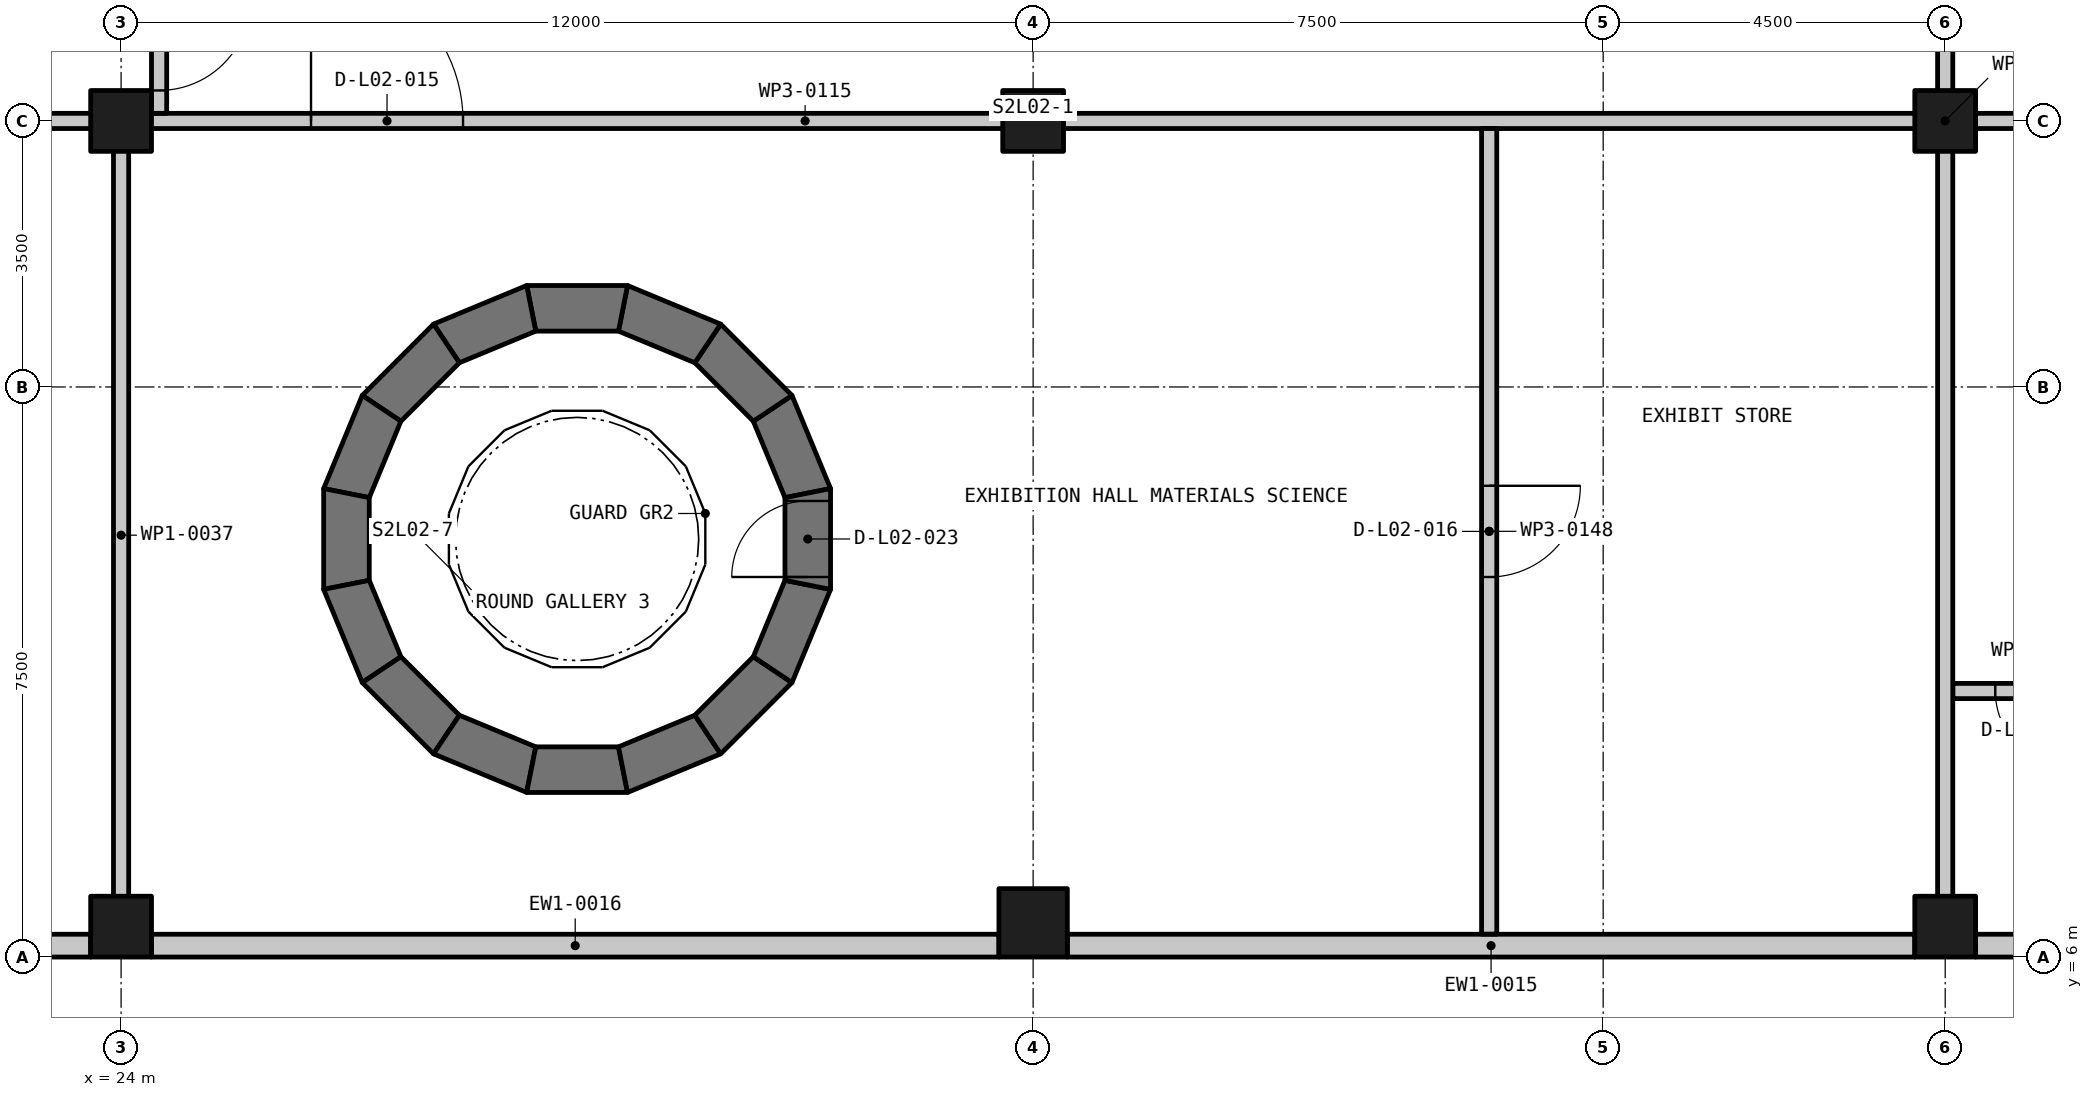
"""IFC4 building model, lengths in metres.
Left out: names, types, materials, properties, quantities, classifications, styles, units other than length and angle.
Written with IfcOpenShell. Run it as: python <this file> out.ifc"""

import sys

from ifc_helpers import new_model, si_unit, direction, frame, frame_2d, origin, origin_2d, place, context, subcontext, project, spatial, polyline, rectangle, outline, extrude, element, fill, save


model = new_model("IFC4")
c1 = context("Model", 3, precision=1e-05, world=origin(), true_north=direction((0.0, 1.0)))
c2 = subcontext(c1, "Body", "Model", "MODEL_VIEW")
j1 = project(units=[si_unit("LENGTHUNIT", "METRE"), si_unit("PLANEANGLEUNIT", "RADIAN")], contexts=[c1])
p1 = place(None, origin())
s1 = spatial("IfcSite", under=j1, at=p1, CompositionType="ELEMENT")
p2 = place(p1, origin())
s2 = spatial("IfcBuilding", under=s1, at=p2, CompositionType="ELEMENT")
p3 = place(p2, frame((0.0, 0.0, 11.25)))
s3 = spatial("IfcBuildingStorey", under=s2, at=p3, CompositionType="ELEMENT", Elevation=11.25)
p4 = place(p3, frame((24.0, 6.4, -0.3), z_axis=(0.0, 0.0, 1.0), x_axis=(1.0, 0.0, 0.0)))
e1 = element("IfcColumn", 1, at=p4, inside=s3, PredefinedType="COLUMN", context=c2, shape_type="SweptSolid", body=[
    extrude(rectangle(XDim=0.8, YDim=0.8, at=origin_2d()), origin(), (0.0, 0.0, 1.0), 4.16),
])
p5 = place(p3, frame((24.0, 17.0, -0.3), z_axis=(0.0, 0.0, 1.0), x_axis=(1.0, 0.0, 0.0)))
e2 = element("IfcColumn", 2, at=p5, inside=s3, PredefinedType="COLUMN", context=c2, shape_type="SweptSolid", body=[
    extrude(rectangle(XDim=0.8, YDim=0.8, at=origin_2d()), origin(), (0.0, 0.0, 1.0), 4.05),
])
p6 = place(p3, frame((36.0, 6.45, -0.3), z_axis=(0.0, 0.0, 1.0), x_axis=(1.0, 0.0, 0.0)))
e3 = element("IfcColumn", 3, at=p6, inside=s3, PredefinedType="COLUMN", context=c2, shape_type="SweptSolid", body=[
    extrude(rectangle(XDim=0.9, YDim=0.9, at=origin_2d()), origin(), (0.0, 0.0, 1.0), 4.16),
])
p7 = place(p3, frame((36.0, 17.0, -0.3), z_axis=(0.0, 0.0, 1.0), x_axis=(1.0, 0.0, 0.0)))
e4 = element("IfcColumn", 4, at=p7, inside=s3, PredefinedType="COLUMN", context=c2, shape_type="SweptSolid", body=[
    extrude(rectangle(XDim=0.8, YDim=0.8, at=origin_2d()), origin(), (0.0, 0.0, 1.0), 4.05),
])
p8 = place(p3, frame((48.0, 6.4, -0.3), z_axis=(0.0, 0.0, 1.0), x_axis=(1.0, 0.0, 0.0)))
e5 = element("IfcColumn", 5, at=p8, inside=s3, PredefinedType="COLUMN", context=c2, shape_type="SweptSolid", body=[
    extrude(rectangle(XDim=0.8, YDim=0.8, at=origin_2d()), origin(), (0.0, 0.0, 1.0), 4.16),
])
p9 = place(p3, frame((48.0, 17.0, -0.3), z_axis=(0.0, 0.0, 1.0), x_axis=(1.0, 0.0, 0.0)))
e6 = element("IfcColumn", 6, at=p9, inside=s3, PredefinedType="COLUMN", context=c2, shape_type="SweptSolid", body=[
    extrude(rectangle(XDim=0.8, YDim=0.8, at=origin_2d()), origin(), (0.0, 0.0, 1.0), 4.05),
])
p10 = place(p3, frame((33.058, 12.049, -0.3), z_axis=(0.0, 0.0, 1.0), x_axis=(-0.382785205205, 0.923837370253, 0.0)))
e7 = element("IfcWall", 7, at=p10, inside=s3, PredefinedType="SHEAR", context=c2, shape_type="SweptSolid", body=[
    extrude(outline(polyline([(0.0, -0.3), (1.327, -0.3), (1.207, 0.3), (0.119, 0.3), (0.0, -0.3)])), origin(), (0.0, 0.0, 1.0), 4.5),
])
p11 = place(p3, frame((32.615, 13.177, -0.3), z_axis=(0.0, 0.0, 1.0), x_axis=(-0.707106781187, 0.707106781187, 0.0)))
e8 = element("IfcWall", 8, at=p11, inside=s3, PredefinedType="SHEAR", context=c2, shape_type="SweptSolid", body=[
    extrude(outline(polyline([(0.0, -0.3), (1.326, -0.3), (1.207, 0.3), (0.119, 0.3), (0.0, -0.3)])), origin(), (0.0, 0.0, 1.0), 4.5),
])
p12 = place(p3, frame((31.774, 14.05, -0.3), z_axis=(0.0, 0.0, 1.0), x_axis=(-0.923837370253, 0.382785205205, 0.0)))
e9 = element("IfcWall", 9, at=p12, inside=s3, PredefinedType="SHEAR", context=c2, shape_type="SweptSolid", body=[
    extrude(outline(polyline([(0.0, -0.3), (1.327, -0.3), (1.207, 0.3), (0.119, 0.3), (0.0, -0.3)])), origin(), (0.0, 0.0, 1.0), 4.5),
])
p13 = place(p3, frame((30.663, 14.535, -0.3), z_axis=(0.0, 0.0, 1.0), x_axis=(-1.0, 0.0, 0.0)))
e10 = element("IfcWall", 10, at=p13, inside=s3, PredefinedType="SHEAR", context=c2, shape_type="SweptSolid", body=[
    extrude(outline(polyline([(0.0, -0.3), (1.327, -0.3), (1.207, 0.3), (0.119, 0.3), (0.0, -0.3)])), origin(), (0.0, 0.0, 1.0), 4.5),
])
p14 = place(p3, frame((29.451, 14.558, -0.3), z_axis=(0.0, 0.0, 1.0), x_axis=(-0.923837370253, -0.382785205205, 0.0)))
e11 = element("IfcWall", 11, at=p14, inside=s3, PredefinedType="SHEAR", context=c2, shape_type="SweptSolid", body=[
    extrude(outline(polyline([(0.0, -0.3), (1.327, -0.3), (1.207, 0.3), (0.119, 0.3), (0.0, -0.3)])), origin(), (0.0, 0.0, 1.0), 4.5),
])
p15 = place(p3, frame((28.323, 14.115, -0.3), z_axis=(0.0, 0.0, 1.0), x_axis=(-0.707106781187, -0.707106781187, 0.0)))
e12 = element("IfcWall", 12, at=p15, inside=s3, PredefinedType="SHEAR", context=c2, shape_type="SweptSolid", body=[
    extrude(outline(polyline([(0.0, -0.3), (1.326, -0.3), (1.207, 0.3), (0.119, 0.3), (0.0, -0.3)])), origin(), (0.0, 0.0, 1.0), 4.5),
])
p16 = place(p3, frame((27.45, 13.274, -0.3), z_axis=(0.0, 0.0, 1.0), x_axis=(-0.382785205205, -0.923837370253, 0.0)))
e13 = element("IfcWall", 13, at=p16, inside=s3, PredefinedType="SHEAR", context=c2, shape_type="SweptSolid", body=[
    extrude(outline(polyline([(0.0, -0.3), (1.327, -0.3), (1.207, 0.3), (0.119, 0.3), (0.0, -0.3)])), origin(), (0.0, 0.0, 1.0), 4.5),
])
p17 = place(p3, frame((26.965, 12.163, -0.3), z_axis=(0.0, 0.0, 1.0), x_axis=(0.0, -1.0, 0.0)))
e14 = element("IfcWall", 14, at=p17, inside=s3, PredefinedType="SHEAR", context=c2, shape_type="SweptSolid", body=[
    extrude(outline(polyline([(0.0, -0.3), (1.327, -0.3), (1.207, 0.3), (0.119, 0.3), (0.0, -0.3)])), origin(), (0.0, 0.0, 1.0), 4.5),
])
p18 = place(p3, frame((26.942, 10.951, -0.3), z_axis=(0.0, 0.0, 1.0), x_axis=(0.382785205205, -0.923837370253, 0.0)))
e15 = element("IfcWall", 15, at=p18, inside=s3, PredefinedType="SHEAR", context=c2, shape_type="SweptSolid", body=[
    extrude(outline(polyline([(0.0, -0.3), (1.327, -0.3), (1.207, 0.3), (0.119, 0.3), (0.0, -0.3)])), origin(), (0.0, 0.0, 1.0), 4.5),
])
p19 = place(p3, frame((27.385, 9.823, -0.3), z_axis=(0.0, 0.0, 1.0), x_axis=(0.707106781187, -0.707106781187, 0.0)))
e16 = element("IfcWall", 16, at=p19, inside=s3, PredefinedType="SHEAR", context=c2, shape_type="SweptSolid", body=[
    extrude(outline(polyline([(0.0, -0.3), (1.326, -0.3), (1.207, 0.3), (0.119, 0.3), (0.0, -0.3)])), origin(), (0.0, 0.0, 1.0), 4.5),
])
p20 = place(p3, frame((28.226, 8.95, -0.3), z_axis=(0.0, 0.0, 1.0), x_axis=(0.923837370253, -0.382785205205, 0.0)))
e17 = element("IfcWall", 17, at=p20, inside=s3, PredefinedType="SHEAR", context=c2, shape_type="SweptSolid", body=[
    extrude(outline(polyline([(0.0, -0.3), (1.327, -0.3), (1.207, 0.3), (0.119, 0.3), (0.0, -0.3)])), origin(), (0.0, 0.0, 1.0), 4.5),
])
p21 = place(p3, frame((29.337, 8.465, -0.3), z_axis=(0.0, 0.0, 1.0), x_axis=(1.0, 0.0, 0.0)))
e18 = element("IfcWall", 18, at=p21, inside=s3, PredefinedType="SHEAR", context=c2, shape_type="SweptSolid", body=[
    extrude(outline(polyline([(0.0, -0.3), (1.327, -0.3), (1.207, 0.3), (0.119, 0.3), (0.0, -0.3)])), origin(), (0.0, 0.0, 1.0), 4.5),
])
p22 = place(p3, frame((30.549, 8.442, -0.3), z_axis=(0.0, 0.0, 1.0), x_axis=(0.923837370253, 0.382785205205, 0.0)))
e19 = element("IfcWall", 19, at=p22, inside=s3, PredefinedType="SHEAR", context=c2, shape_type="SweptSolid", body=[
    extrude(outline(polyline([(0.0, -0.3), (1.327, -0.3), (1.207, 0.3), (0.119, 0.3), (0.0, -0.3)])), origin(), (0.0, 0.0, 1.0), 4.5),
])
p23 = place(p3, frame((31.677, 8.885, -0.3), z_axis=(0.0, 0.0, 1.0), x_axis=(0.707106781187, 0.707106781187, 0.0)))
e20 = element("IfcWall", 20, at=p23, inside=s3, PredefinedType="SHEAR", context=c2, shape_type="SweptSolid", body=[
    extrude(outline(polyline([(0.0, -0.3), (1.326, -0.3), (1.207, 0.3), (0.119, 0.3), (0.0, -0.3)])), origin(), (0.0, 0.0, 1.0), 4.5),
])
p24 = place(p3, frame((32.55, 9.726, -0.3), z_axis=(0.0, 0.0, 1.0), x_axis=(0.382785205205, 0.923837370253, 0.0)))
e21 = element("IfcWall", 21, at=p24, inside=s3, PredefinedType="SHEAR", context=c2, shape_type="SweptSolid", body=[
    extrude(outline(polyline([(0.0, -0.3), (1.327, -0.3), (1.207, 0.3), (0.119, 0.3), (0.0, -0.3)])), origin(), (0.0, 0.0, 1.0), 4.5),
])
p25 = place(p3, frame((33.035, 10.837, -0.3), z_axis=(0.0, 0.0, 1.0), x_axis=(0.0, 1.0, 0.0)))
e22 = element("IfcWall", 22, at=p25, inside=s3, PredefinedType="SHEAR", context=c2, shape_type="SweptSolid", body=[
    extrude(outline(polyline([(0.0, -0.3), (1.327, -0.3), (1.207, 0.3), (0.119, 0.3), (0.0, -0.3)])), origin(), (0.0, 0.0, 1.0), 4.5),
])
p26 = place(p25, frame((0.163, 0.0, 0.3)))
e23 = element("IfcOpeningElement", 23, at=p26, cuts=e22, PredefinedType="OPENING", context=c2, shape_type="SweptSolid", body=[
    extrude(rectangle(XDim=1.0, YDim=2.2, at=frame_2d((0.5, 1.1))), frame((0.0, 0.31, 0.0), z_axis=(0.0, -1.0, 0.0), x_axis=(1.0, 0.0, 0.0)), (0.0, 0.0, 1.0), 0.62),
])
p27 = place(p2, origin())
s4 = spatial("IfcBuildingStorey", under=s2, at=p27, CompositionType="ELEMENT", Elevation=0.0)
for number, where, z_axis, x_axis in (
    (24, (36.0, 5.0, -0.2), (0.0, 0.0, 1.0), (1.0, 0.0, 0.0)),
    (25, (44.4, 5.0, -0.2), (0.0, 0.0, 1.0), (1.0, 0.0, 0.0)),
):
    element("IfcWall", number, at=place(p27, frame(where, z_axis=z_axis, x_axis=x_axis)), inside=s4, PredefinedType="SOLIDWALL", context=c2, shape_type="SweptSolid", body=[
        extrude(rectangle(XDim=3.6, YDim=2.0, at=frame_2d((1.8, 0.0))), origin(), (0.0, 0.0, 1.0), 18.2),
    ])
p28 = place(p3, frame((59.6, 6.15, 0.0), z_axis=(0.0, 0.0, 1.0), x_axis=(-1.0, 0.0, 0.0)))
e26 = element("IfcWall", 26, at=p28, inside=s3, PredefinedType="SOLIDWALL", context=c2, shape_type="SweptSolid", body=[
    extrude(rectangle(XDim=11.2, YDim=0.3, at=frame_2d((5.6, 0.0))), origin(), (0.0, 0.0, 1.0), 3.86),
])
for number, where, z_axis, x_axis in (
    (27, (47.6, 6.15, 0.0), (0.0, 0.0, 1.0), (-1.0, 0.0, 0.0)),
    (28, (35.55, 6.15, 0.0), (0.0, 0.0, 1.0), (-1.0, 0.0, 0.0)),
):
    element("IfcWall", number, at=place(p3, frame(where, z_axis=z_axis, x_axis=x_axis)), inside=s3, PredefinedType="SOLIDWALL", context=c2, shape_type="SweptSolid", body=[
        extrude(rectangle(XDim=11.15, YDim=0.3, at=frame_2d((5.575, 0.0))), origin(), (0.0, 0.0, 1.0), 3.86),
    ])
p29 = place(p3, frame((23.6, 6.15, 0.0), z_axis=(0.0, 0.0, 1.0), x_axis=(-1.0, 0.0, 0.0)))
e29 = element("IfcWall", 29, at=p29, inside=s3, PredefinedType="SOLIDWALL", context=c2, shape_type="SweptSolid", body=[
    extrude(rectangle(XDim=11.2, YDim=0.3, at=frame_2d((5.6, 0.0))), origin(), (0.0, 0.0, 1.0), 3.86),
])
p30 = place(p29, frame((7.85, 0.0, 0.75)))
e30 = element("IfcOpeningElement", 30, at=p30, cuts=e29, PredefinedType="OPENING", context=c2, shape_type="SweptSolid", body=[
    extrude(rectangle(XDim=1.5, YDim=1.5, at=frame_2d((0.75, 0.75))), frame((0.0, 0.16, 0.0), z_axis=(0.0, -1.0, 0.0), x_axis=(1.0, 0.0, 0.0)), (0.0, 0.0, 1.0), 0.32),
])
p31 = place(p29, frame((1.85, 0.0, 0.75)))
e31 = element("IfcOpeningElement", 31, at=p31, cuts=e29, PredefinedType="OPENING", context=c2, shape_type="SweptSolid", body=[
    extrude(rectangle(XDim=1.5, YDim=1.5, at=frame_2d((0.75, 0.75))), frame((0.0, 0.16, 0.0), z_axis=(0.0, -1.0, 0.0), x_axis=(1.0, 0.0, 0.0)), (0.0, 0.0, 1.0), 0.32),
])
p32 = place(p27, frame((39.6, 5.0, 4.2), z_axis=(0.0, 0.0, 1.0), x_axis=(1.0, 0.0, 0.0)))
e32 = element("IfcWall", 32, at=p32, inside=s4, PredefinedType="SOLIDWALL", context=c2, shape_type="SweptSolid", body=[
    extrude(rectangle(XDim=4.8, YDim=2.0, at=frame_2d((2.4, 0.0))), origin(), (0.0, 0.0, 1.0), 13.8),
])
p33 = place(p3, frame((50.332, 9.5, 0.0), z_axis=(0.0, 0.0, 1.0), x_axis=(-1.0, 0.0, 0.0)))
e33 = element("IfcWall", 33, at=p33, inside=s3, PredefinedType="PARTITIONING", context=c2, shape_type="SweptSolid", body=[
    extrude(rectangle(XDim=2.232, YDim=0.2, at=frame_2d((1.116, 0.0))), origin(), (0.0, 0.0, 1.0), 4.35),
])
p34 = place(p33, frame((0.673, 0.0, 0.0)))
e34 = element("IfcOpeningElement", 34, at=p34, cuts=e33, PredefinedType="OPENING", context=c2, shape_type="SweptSolid", body=[
    extrude(rectangle(XDim=1.0, YDim=2.1, at=frame_2d((0.5, 1.05))), frame((0.0, 0.11, 0.0), z_axis=(0.0, -1.0, 0.0), x_axis=(1.0, 0.0, 0.0)), (0.0, 0.0, 1.0), 0.22),
])
p35 = place(p3, frame((5.9, 17.0, 0.0), z_axis=(0.0, 0.0, 1.0), x_axis=(1.0, 0.0, 0.0)))
e35 = element("IfcWall", 35, at=p35, inside=s3, PredefinedType="PARTITIONING", context=c2, shape_type="SweptSolid", body=[
    extrude(rectangle(XDim=54.2, YDim=0.2, at=frame_2d((27.1, 0.0))), origin(), (0.0, 0.0, 1.0), 3.75),
])
p36 = place(p35, frame((12.3, 0.0, 0.0)))
e36 = element("IfcOpeningElement", 36, at=p36, cuts=e35, PredefinedType="OPENING", context=c2, shape_type="SweptSolid", body=[
    extrude(rectangle(XDim=2.0, YDim=2.1, at=frame_2d((1.0, 1.05))), frame((0.0, 0.11, 0.0), z_axis=(0.0, -1.0, 0.0), x_axis=(1.0, 0.0, 0.0)), (0.0, 0.0, 1.0), 0.22),
])
p37 = place(p35, frame((20.599, 0.0, 0.0)))
e37 = element("IfcOpeningElement", 37, at=p37, cuts=e35, PredefinedType="OPENING", context=c2, shape_type="SweptSolid", body=[
    extrude(rectangle(XDim=2.0, YDim=2.1, at=frame_2d((1.0, 1.05))), frame((0.0, 0.11, 0.0), z_axis=(0.0, -1.0, 0.0), x_axis=(1.0, 0.0, 0.0)), (0.0, 0.0, 1.0), 0.22),
])
p38 = place(p35, frame((47.35, 0.0, 0.0)))
e38 = element("IfcOpeningElement", 38, at=p38, cuts=e35, PredefinedType="OPENING", context=c2, shape_type="SweptSolid", body=[
    extrude(rectangle(XDim=1.5, YDim=2.1, at=frame_2d((0.75, 1.05))), frame((0.0, 0.11, 0.0), z_axis=(0.0, -1.0, 0.0), x_axis=(1.0, 0.0, 0.0)), (0.0, 0.0, 1.0), 0.22),
])
p39 = place(p3, frame((48.0, 6.2, 0.0), z_axis=(0.0, 0.0, 1.0), x_axis=(0.0, 1.0, 0.0)))
e39 = element("IfcWall", 39, at=p39, inside=s3, PredefinedType="PARTITIONING", context=c2, shape_type="SweptSolid", body=[
    extrude(rectangle(XDim=21.6, YDim=0.2, at=frame_2d((10.8, 0.0))), origin(), (0.0, 0.0, 1.0), 3.75),
])
p40 = place(p3, frame((42.0, 16.9, 0.0), z_axis=(0.0, 0.0, 1.0), x_axis=(0.0, -1.0, 0.0)))
e40 = element("IfcWall", 40, at=p40, inside=s3, PredefinedType="PARTITIONING", context=c2, shape_type="SweptSolid", body=[
    extrude(rectangle(XDim=10.598, YDim=0.2, at=frame_2d((5.299, 0.0))), origin(), (0.0, 0.0, 1.0), 3.86),
])
p41 = place(p40, frame((4.7, 0.0, 0.0)))
e41 = element("IfcOpeningElement", 41, at=p41, cuts=e40, PredefinedType="OPENING", context=c2, shape_type="SweptSolid", body=[
    extrude(rectangle(XDim=1.2, YDim=2.1, at=frame_2d((0.6, 1.05))), frame((0.0, 0.11, 0.0), z_axis=(0.0, -1.0, 0.0), x_axis=(1.0, 0.0, 0.0)), (0.0, 0.0, 1.0), 0.22),
])
p42 = place(p3, frame((24.5, 18.998, 0.0), z_axis=(0.0, 0.0, 1.0), x_axis=(0.0, -1.0, 0.0)))
e42 = element("IfcWall", 42, at=p42, inside=s3, PredefinedType="PARTITIONING", context=c2, shape_type="SweptSolid", body=[
    extrude(rectangle(XDim=1.898, YDim=0.2, at=frame_2d((0.949, 0.0))), origin(), (0.0, 0.0, 1.0), 4.35),
])
p43 = place(p42, frame((0.397, 0.0, 0.0)))
e43 = element("IfcOpeningElement", 43, at=p43, cuts=e42, PredefinedType="OPENING", context=c2, shape_type="SweptSolid", body=[
    extrude(rectangle(XDim=1.2, YDim=2.1, at=frame_2d((0.6, 1.05))), frame((0.0, 0.11, 0.0), z_axis=(0.0, -1.0, 0.0), x_axis=(1.0, 0.0, 0.0)), (0.0, 0.0, 1.0), 0.22),
])
p44 = place(p3, frame((24.0, 6.2, 0.0), z_axis=(0.0, 0.0, 1.0), x_axis=(0.0, 1.0, 0.0)))
e44 = element("IfcWall", 44, at=p44, inside=s3, PredefinedType="PARTITIONING", context=c2, shape_type="SweptSolid", body=[
    extrude(rectangle(XDim=10.7, YDim=0.2, at=frame_2d((5.35, 0.0))), origin(), (0.0, 0.0, 1.0), 3.86),
])
p45 = place(p37, origin())
e45 = element("IfcDoor", 45, at=p45, inside=s3, OperationType="DOUBLE_DOOR_SINGLE_SWING", PredefinedType="DOOR", context=c2, shape_type="SweptSolid", body=[
    extrude(rectangle(XDim=2.0, YDim=2.1, at=frame_2d((1.0, 1.05))), frame((0.0, 0.025, 0.0), z_axis=(0.0, -1.0, 0.0), x_axis=(1.0, 0.0, 0.0)), (0.0, 0.0, 1.0), 0.05),
])
fill(e37, e45)
p46 = place(p41, origin())
e46 = element("IfcDoor", 46, at=p46, inside=s3, OperationType="SINGLE_SWING_LEFT", PredefinedType="DOOR", context=c2, shape_type="SweptSolid", body=[
    extrude(rectangle(XDim=1.2, YDim=2.1, at=frame_2d((0.6, 1.05))), frame((0.0, 0.025, 0.0), z_axis=(0.0, -1.0, 0.0), x_axis=(1.0, 0.0, 0.0)), (0.0, 0.0, 1.0), 0.05),
])
fill(e41, e46)
p47 = place(p34, origin())
e47 = element("IfcDoor", 47, at=p47, inside=s3, OperationType="SINGLE_SWING_LEFT", PredefinedType="DOOR", context=c2, shape_type="SweptSolid", body=[
    extrude(rectangle(XDim=1.0, YDim=2.1, at=frame_2d((0.5, 1.05))), frame((0.0, 0.025, 0.0), z_axis=(0.0, -1.0, 0.0), x_axis=(1.0, 0.0, 0.0)), (0.0, 0.0, 1.0), 0.05),
])
fill(e34, e47)
p48 = place(p43, origin())
e48 = element("IfcDoor", 48, at=p48, inside=s3, OperationType="SINGLE_SWING_LEFT", PredefinedType="DOOR", context=c2, shape_type="SweptSolid", body=[
    extrude(rectangle(XDim=1.2, YDim=2.1, at=frame_2d((0.6, 1.05))), frame((0.0, 0.025, 0.0), z_axis=(0.0, -1.0, 0.0), x_axis=(1.0, 0.0, 0.0)), (0.0, 0.0, 1.0), 0.05),
])
fill(e43, e48)
p49 = place(p26, origin())
e49 = element("IfcDoor", 49, at=p49, inside=s3, OperationType="SINGLE_SWING_LEFT", PredefinedType="DOOR", context=c2, shape_type="SweptSolid", body=[
    extrude(rectangle(XDim=1.0, YDim=2.2, at=frame_2d((0.5, 1.1))), frame((0.0, 0.025, 0.0), z_axis=(0.0, -1.0, 0.0), x_axis=(1.0, 0.0, 0.0)), (0.0, 0.0, 1.0), 0.05),
])
fill(e23, e49)
save(model, sys.argv[1])
